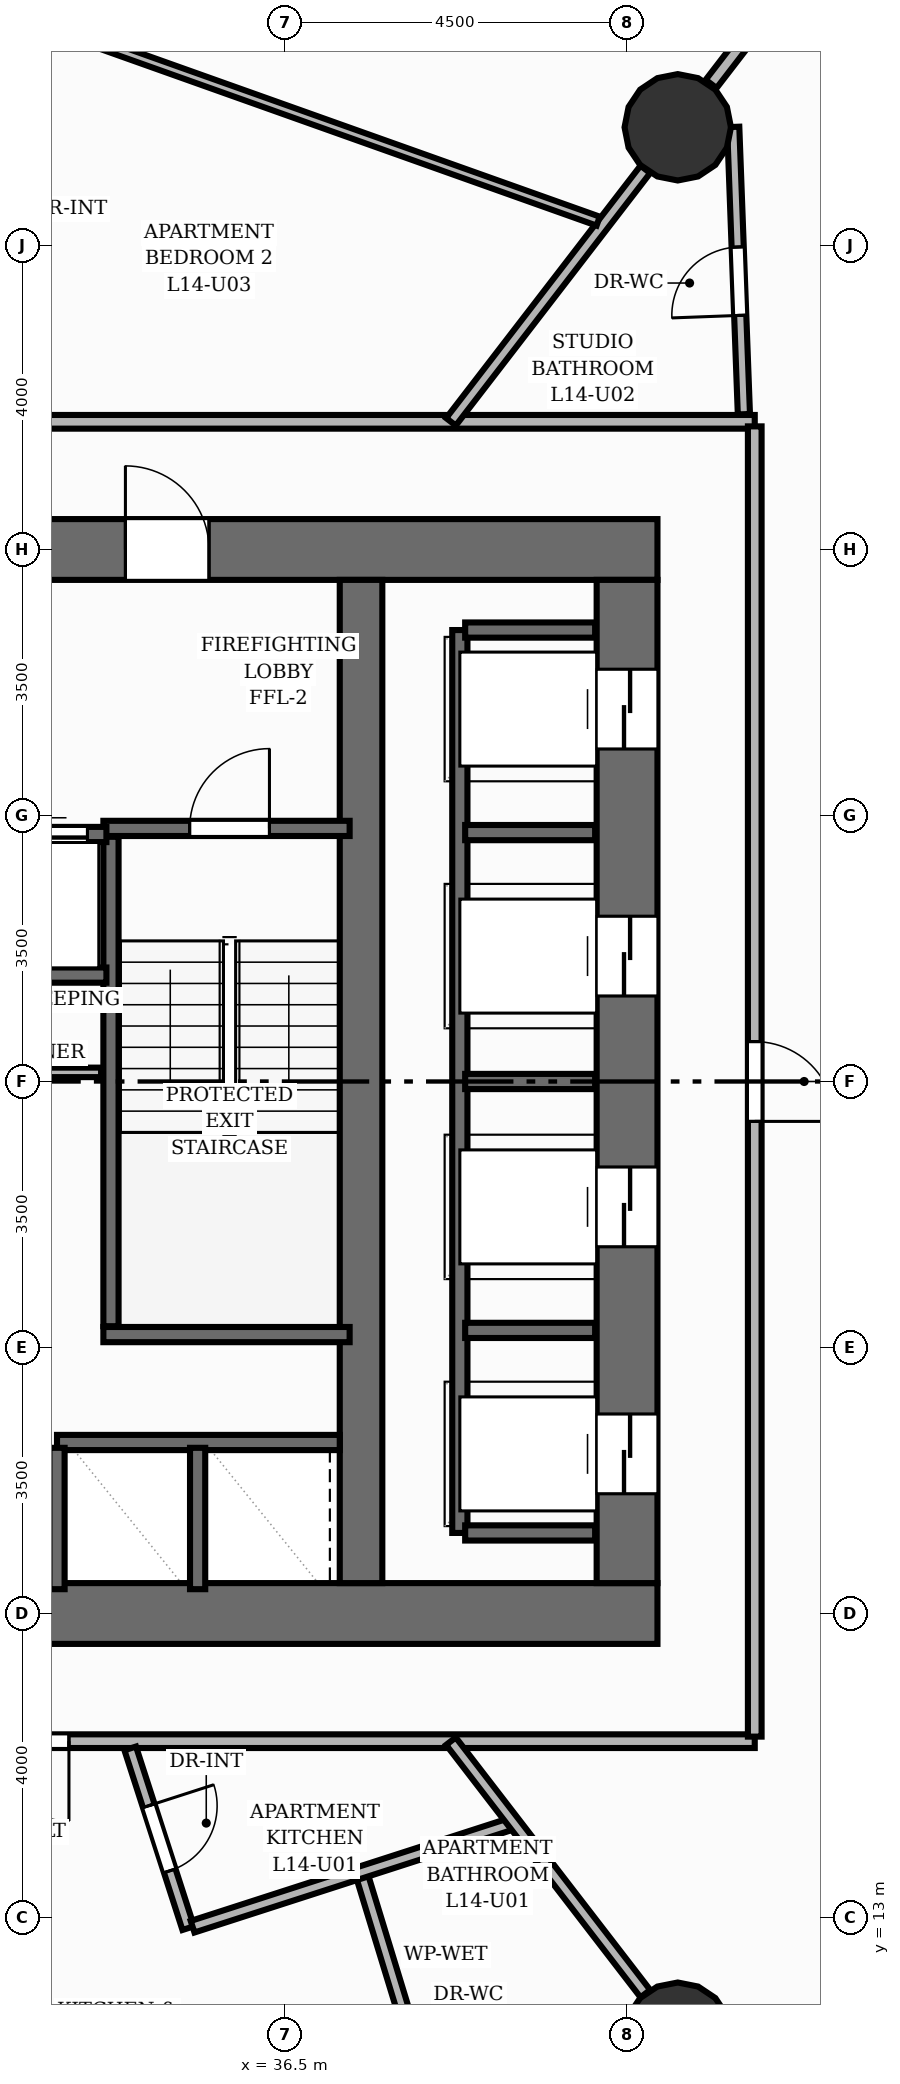
"""IFC4 building model, lengths in metres.
Left out: names, types, materials, properties, quantities, classifications, styles, units other than length and angle.
Written with IfcOpenShell. Run it as: python <this file> out.ifc"""

import sys

from ifc_helpers import new_model, si_unit, direction, frame, frame_2d, origin, origin_2d, place, context, subcontext, project, spatial, rectangle, circle, extrude, element, fill, save


model = new_model("IFC4")
c1 = context("Model", 3, precision=1e-05, world=origin(), true_north=direction((0.0, 1.0)))
c2 = subcontext(c1, "Body", "Model", "MODEL_VIEW")
j1 = project(units=[si_unit("LENGTHUNIT", "METRE"), si_unit("PLANEANGLEUNIT", "RADIAN")], contexts=[c1])
p1 = place(None, origin())
s1 = spatial("IfcSite", under=j1, at=p1, CompositionType="ELEMENT")
p2 = place(p1, origin())
s2 = spatial("IfcBuilding", under=s1, at=p2, CompositionType="ELEMENT")
p3 = place(p2, frame((0.0, 0.0, 50.4)))
s3 = spatial("IfcBuildingStorey", under=s2, at=p3, CompositionType="ELEMENT", Elevation=50.4)
p4 = place(p3, frame((22.6, 17.0, 0.0), z_axis=(0.0, 0.0, 1.0), x_axis=(1.0, 0.0, 0.0)))
e1 = element("IfcWall", 1, at=p4, inside=s3, PredefinedType="SHEAR", context=c2, shape_type="SweptSolid", body=[
    extrude(rectangle(XDim=18.8, YDim=0.8, at=frame_2d((9.4, 0.0))), origin(), (0.0, 0.0, 1.0), 3.2),
])
p5 = place(p4, frame((5.9, 0.0, 0.0)))
e2 = element("IfcOpeningElement", 2, at=p5, cuts=e1, PredefinedType="OPENING", context=c2, shape_type="SweptSolid", body=[
    extrude(rectangle(XDim=1.1, YDim=2.15, at=frame_2d((0.55, 1.075))), frame((0.0, 0.41, 0.0), z_axis=(0.0, -1.0, 0.0), x_axis=(1.0, 0.0, 0.0)), (0.0, 0.0, 1.0), 0.82),
])
p6 = place(p4, frame((9.45, 0.0, 0.0)))
e3 = element("IfcOpeningElement", 3, at=p6, cuts=e1, PredefinedType="OPENING", context=c2, shape_type="SweptSolid", body=[
    extrude(rectangle(XDim=0.9, YDim=2.1, at=frame_2d((0.45, 1.05))), frame((0.0, 0.41, 0.0), z_axis=(0.0, -1.0, 0.0), x_axis=(1.0, 0.0, 0.0)), (0.0, 0.0, 1.0), 0.82),
])
p7 = place(p3, frame((22.6, 31.0, 0.0), z_axis=(0.0, 0.0, 1.0), x_axis=(1.0, 0.0, 0.0)))
e4 = element("IfcWall", 4, at=p7, inside=s3, PredefinedType="SHEAR", context=c2, shape_type="SweptSolid", body=[
    extrude(rectangle(XDim=18.8, YDim=0.8, at=frame_2d((9.4, 0.0))), origin(), (0.0, 0.0, 1.0), 3.2),
])
p8 = place(p7, frame((11.8, 0.0, 0.0)))
e5 = element("IfcOpeningElement", 5, at=p8, cuts=e4, PredefinedType="OPENING", context=c2, shape_type="SweptSolid", body=[
    extrude(rectangle(XDim=1.1, YDim=2.15, at=frame_2d((0.55, 1.075))), frame((0.0, 0.41, 0.0), z_axis=(0.0, -1.0, 0.0), x_axis=(1.0, 0.0, 0.0)), (0.0, 0.0, 1.0), 0.82),
])
p9 = place(p3, frame((41.0, 17.4, 0.0), z_axis=(0.0, 0.0, 1.0), x_axis=(0.0, 1.0, 0.0)))
e6 = element("IfcWall", 6, at=p9, inside=s3, PredefinedType="SHEAR", context=c2, shape_type="SweptSolid", body=[
    extrude(rectangle(XDim=13.2, YDim=0.8, at=frame_2d((6.6, 0.0))), origin(), (0.0, 0.0, 1.0), 3.2),
])
p10 = place(p9, frame((1.175, 0.0, 0.0)))
e7 = element("IfcOpeningElement", 7, at=p10, cuts=e6, PredefinedType="OPENING", context=c2, shape_type="SweptSolid", body=[
    extrude(rectangle(XDim=1.05, YDim=2.15, at=frame_2d((0.525, 1.075))), frame((0.0, 0.41, 0.0), z_axis=(0.0, -1.0, 0.0), x_axis=(1.0, 0.0, 0.0)), (0.0, 0.0, 1.0), 0.82),
])
p11 = place(p9, frame((4.425, 0.0, 0.0)))
e8 = element("IfcOpeningElement", 8, at=p11, cuts=e6, PredefinedType="OPENING", context=c2, shape_type="SweptSolid", body=[
    extrude(rectangle(XDim=1.05, YDim=2.15, at=frame_2d((0.525, 1.075))), frame((0.0, 0.41, 0.0), z_axis=(0.0, -1.0, 0.0), x_axis=(1.0, 0.0, 0.0)), (0.0, 0.0, 1.0), 0.82),
])
p12 = place(p9, frame((7.725, 0.0, 0.0)))
e9 = element("IfcOpeningElement", 9, at=p12, cuts=e6, PredefinedType="OPENING", context=c2, shape_type="SweptSolid", body=[
    extrude(rectangle(XDim=1.05, YDim=2.15, at=frame_2d((0.525, 1.075))), frame((0.0, 0.41, 0.0), z_axis=(0.0, -1.0, 0.0), x_axis=(1.0, 0.0, 0.0)), (0.0, 0.0, 1.0), 0.82),
])
p13 = place(p9, frame((10.975, 0.0, 0.0)))
e10 = element("IfcOpeningElement", 10, at=p13, cuts=e6, PredefinedType="OPENING", context=c2, shape_type="SweptSolid", body=[
    extrude(rectangle(XDim=1.05, YDim=2.15, at=frame_2d((0.525, 1.075))), frame((0.0, 0.41, 0.0), z_axis=(0.0, -1.0, 0.0), x_axis=(1.0, 0.0, 0.0)), (0.0, 0.0, 1.0), 0.82),
])
p14 = place(p3, frame((37.5, 17.4, 0.0), z_axis=(0.0, 0.0, 1.0), x_axis=(0.0, 1.0, 0.0)))
e11 = element("IfcWall", 11, at=p14, inside=s3, PredefinedType="SHEAR", context=c2, shape_type="SweptSolid", body=[
    extrude(rectangle(XDim=13.2, YDim=0.56, at=frame_2d((6.6, 0.0))), origin(), (0.0, 0.0, 1.0), 3.2),
])
for number, where, z_axis, x_axis in (
    (12, (41.667, 36.555, 0.0), (0.0, 0.0, 1.0), (1.0, 0.0, 0.0)),
    (13, (41.667, 11.445, 0.0), (0.0, 0.0, 1.0), (1.0, 0.0, 0.0)),
):
    element("IfcColumn", number, at=place(p3, frame(where, z_axis=z_axis, x_axis=x_axis)), inside=s3, PredefinedType="COLUMN", context=c2, shape_type="SweptSolid", body=[
        extrude(circle(Radius=0.7, at=origin_2d()), origin(), (0.0, 0.0, 1.0), 3.2),
    ])
p15 = place(p3, frame((42.122, 39.116, 0.0), z_axis=(0.0, 0.0, 1.0), x_axis=(0.858069400356, -0.513533742001, 0.0)))
e14 = element("IfcWall", 14, at=p15, inside=s3, PredefinedType="SOLIDWALL", context=c2, shape_type="SweptSolid", body=[
    extrude(rectangle(XDim=3.323, YDim=0.25, at=frame_2d((1.661, 0.0))), origin(), (0.0, 0.0, 1.0), 2.96),
])
p16 = place(p3, frame((34.21, 20.78, 0.0), z_axis=(0.0, 0.0, 1.0), x_axis=(0.0, 1.0, 0.0)))
e15 = element("IfcWall", 15, at=p16, inside=s3, PredefinedType="SHEAR", context=c2, shape_type="SweptSolid", body=[
    extrude(rectangle(XDim=6.44, YDim=0.2, at=frame_2d((3.22, 0.0))), origin(), (0.0, 0.0, 1.0), 3.2),
])
p17 = place(p3, frame((34.11, 20.67, 0.0), z_axis=(0.0, 0.0, 1.0), x_axis=(1.0, 0.0, 0.0)))
e16 = element("IfcWall", 16, at=p17, inside=s3, PredefinedType="SHEAR", context=c2, shape_type="SweptSolid", body=[
    extrude(rectangle(XDim=3.24, YDim=0.2, at=frame_2d((1.62, 0.0))), origin(), (0.0, 0.0, 1.0), 3.2),
])
p18 = place(p3, frame((34.11, 27.33, 0.0), z_axis=(0.0, 0.0, 1.0), x_axis=(1.0, 0.0, 0.0)))
e17 = element("IfcWall", 17, at=p18, inside=s3, PredefinedType="SHEAR", context=c2, shape_type="SweptSolid", body=[
    extrude(rectangle(XDim=3.24, YDim=0.2, at=frame_2d((1.62, 0.0))), origin(), (0.0, 0.0, 1.0), 3.2),
])
p19 = place(p18, frame((1.135, 0.0, 0.0)))
e18 = element("IfcOpeningElement", 18, at=p19, cuts=e17, PredefinedType="OPENING", context=c2, shape_type="SweptSolid", body=[
    extrude(rectangle(XDim=1.05, YDim=2.15, at=frame_2d((0.525, 1.075))), frame((0.0, 0.11, 0.0), z_axis=(0.0, -1.0, 0.0), x_axis=(1.0, 0.0, 0.0)), (0.0, 0.0, 1.0), 0.22),
])
p20 = place(p3, frame((31.85, 27.25, 0.0), z_axis=(0.0, 0.0, 1.0), x_axis=(1.0, 0.0, 0.0)))
e19 = element("IfcWall", 19, at=p20, inside=s3, PredefinedType="SHEAR", context=c2, shape_type="SweptSolid", body=[
    extrude(rectangle(XDim=2.3, YDim=0.2, at=frame_2d((1.15, 0.0))), origin(), (0.0, 0.0, 1.0), 3.2),
])
p21 = place(p20, frame((0.95, 0.0, 0.0)))
e20 = element("IfcOpeningElement", 20, at=p21, cuts=e19, PredefinedType="OPENING", context=c2, shape_type="SweptSolid", body=[
    extrude(rectangle(XDim=1.1, YDim=2.15, at=frame_2d((0.55, 1.075))), frame((0.0, 0.11, 0.0), z_axis=(0.0, -1.0, 0.0), x_axis=(1.0, 0.0, 0.0)), (0.0, 0.0, 1.0), 0.22),
])
p22 = place(p3, frame((31.85, 25.4, 0.0), z_axis=(0.0, 0.0, 1.0), x_axis=(1.0, 0.0, 0.0)))
e21 = element("IfcWall", 21, at=p22, inside=s3, PredefinedType="SHEAR", context=c2, shape_type="SweptSolid", body=[
    extrude(rectangle(XDim=2.3, YDim=0.2, at=frame_2d((1.15, 0.0))), origin(), (0.0, 0.0, 1.0), 3.2),
])
p23 = place(p3, frame((38.8, 18.06, 0.0), z_axis=(0.0, 0.0, 1.0), x_axis=(0.0, 1.0, 0.0)))
e22 = element("IfcWall", 22, at=p23, inside=s3, PredefinedType="SHEAR", context=c2, shape_type="SweptSolid", body=[
    extrude(rectangle(XDim=11.88, YDim=0.2, at=frame_2d((5.94, 0.0))), origin(), (0.0, 0.0, 1.0), 3.2),
])
for number, where, z_axis, x_axis in (
    (23, (38.87, 18.06, 0.0), (0.0, 0.0, 1.0), (1.0, 0.0, 0.0)),
    (24, (38.87, 29.94, 0.0), (0.0, 0.0, 1.0), (1.0, 0.0, 0.0)),
    (25, (38.87, 20.725, 0.0), (0.0, 0.0, 1.0), (1.0, 0.0, 0.0)),
    (26, (38.87, 24.0, 0.0), (0.0, 0.0, 1.0), (1.0, 0.0, 0.0)),
    (27, (38.87, 27.275, 0.0), (0.0, 0.0, 1.0), (1.0, 0.0, 0.0)),
):
    element("IfcWall", number, at=place(p3, frame(where, z_axis=z_axis, x_axis=x_axis)), inside=s3, PredefinedType="SHEAR", context=c2, shape_type="SweptSolid", body=[
        extrude(rectangle(XDim=1.71, YDim=0.2, at=frame_2d((0.855, 0.0))), origin(), (0.0, 0.0, 1.0), 3.2),
    ])
p24 = place(p3, frame((33.5, 19.25, 0.0), z_axis=(0.0, 0.0, 1.0), x_axis=(1.0, 0.0, 0.0)))
e28 = element("IfcWall", 28, at=p24, inside=s3, PredefinedType="SHEAR", context=c2, shape_type="SweptSolid", body=[
    extrude(rectangle(XDim=3.72, YDim=0.2, at=frame_2d((1.86, 0.0))), origin(), (0.0, 0.0, 1.0), 3.2),
])
for number, where, z_axis, x_axis in (
    (29, (33.5, 17.32, 0.0), (0.0, 0.0, 1.0), (0.0, 1.0, 0.0)),
    (30, (35.35, 17.32, 0.0), (0.0, 0.0, 1.0), (0.0, 1.0, 0.0)),
):
    element("IfcWall", number, at=place(p3, frame(where, z_axis=z_axis, x_axis=x_axis)), inside=s3, PredefinedType="SHEAR", context=c2, shape_type="SweptSolid", body=[
        extrude(rectangle(XDim=1.86, YDim=0.2, at=frame_2d((0.93, 0.0))), origin(), (0.0, 0.0, 1.0), 3.2),
    ])
p25 = place(p3, frame((31.76, 24.12, 0.0), z_axis=(0.0, 0.0, 1.0), x_axis=(1.0, 0.0, 0.0)))
e31 = element("IfcWall", 31, at=p25, inside=s3, PredefinedType="PARTITIONING", context=c2, shape_type="SweptSolid", body=[
    extrude(rectangle(XDim=2.32, YDim=0.125, at=frame_2d((1.16, 0.0))), origin(), (0.0, 0.0, 1.0), 2.955),
])
p26 = place(p25, frame((0.64, 0.0, 0.0)))
e32 = element("IfcOpeningElement", 32, at=p26, cuts=e31, PredefinedType="OPENING", context=c2, shape_type="SweptSolid", body=[
    extrude(rectangle(XDim=0.9, YDim=2.1, at=frame_2d((0.45, 1.05))), frame((0.0, 0.073, 0.0), z_axis=(0.0, -1.0, 0.0), x_axis=(1.0, 0.0, 0.0)), (0.0, 0.0, 1.0), 0.145),
])
p27 = place(p3, frame((42.106, 37.126, 0.0), z_axis=(0.0, 0.0, 1.0), x_axis=(0.610021184497, 0.792385104898, 0.0)))
e33 = element("IfcWall", 33, at=p27, inside=s3, PredefinedType="PARTITIONING", context=c2, shape_type="SweptSolid", body=[
    extrude(rectangle(XDim=1.672, YDim=0.18, at=frame_2d((0.836, 0.0))), origin(), (0.0, 0.0, 1.0), 2.178),
])
p28 = place(p3, frame((42.68, 15.32, 0.0), z_axis=(0.0, 0.0, 1.0), x_axis=(-1.0, 0.0, 0.0)))
e34 = element("IfcWall", 34, at=p28, inside=s3, PredefinedType="PARTITIONING", context=c2, shape_type="SweptSolid", body=[
    extrude(rectangle(XDim=21.239, YDim=0.18, at=frame_2d((10.619, 0.0))), origin(), (0.0, 0.0, 1.0), 2.955),
])
p29 = place(p28, frame((9.023, 0.0, 0.0)))
e35 = element("IfcOpeningElement", 35, at=p29, cuts=e34, PredefinedType="OPENING", context=c2, shape_type="SweptSolid", body=[
    extrude(rectangle(XDim=1.05, YDim=2.15, at=frame_2d((0.525, 1.075))), frame((0.0, 0.1, 0.0), z_axis=(0.0, -1.0, 0.0), x_axis=(1.0, 0.0, 0.0)), (0.0, 0.0, 1.0), 0.2),
])
p30 = place(p3, frame((32.15, 32.68, 0.0), z_axis=(0.0, 0.0, 1.0), x_axis=(1.0, 0.0, 0.0)))
e36 = element("IfcWall", 36, at=p30, inside=s3, PredefinedType="PARTITIONING", context=c2, shape_type="SweptSolid", body=[
    extrude(rectangle(XDim=10.53, YDim=0.18, at=frame_2d((5.265, 0.0))), origin(), (0.0, 0.0, 1.0), 2.955),
])
p31 = place(p3, frame((42.68, 32.62, 0.0), z_axis=(0.0, 0.0, 1.0), x_axis=(0.0, -1.0, 0.0)))
e37 = element("IfcWall", 37, at=p31, inside=s3, PredefinedType="PARTITIONING", context=c2, shape_type="SweptSolid", body=[
    extrude(rectangle(XDim=17.24, YDim=0.18, at=frame_2d((8.62, 0.0))), origin(), (0.0, 0.0, 1.0), 2.955),
])
p32 = place(p31, frame((8.095, 0.0, 0.0)))
e38 = element("IfcOpeningElement", 38, at=p32, cuts=e37, PredefinedType="OPENING", context=c2, shape_type="SweptSolid", body=[
    extrude(rectangle(XDim=1.05, YDim=2.15, at=frame_2d((0.525, 1.075))), frame((0.0, 0.1, 0.0), z_axis=(0.0, -1.0, 0.0), x_axis=(1.0, 0.0, 0.0)), (0.0, 0.0, 1.0), 0.2),
])
p33 = place(p3, frame((37.5, 13.594, 0.0), z_axis=(0.0, 0.0, 1.0), x_axis=(0.292167210162, -0.956367252318, 0.0)))
e39 = element("IfcWall", 39, at=p33, inside=s3, PredefinedType="PLUMBINGWALL", context=c2, shape_type="SweptSolid", body=[
    extrude(rectangle(XDim=5.438, YDim=0.16, at=frame_2d((2.719, 0.0))), origin(), (0.0, 0.0, 1.0), 2.955),
])
p34 = place(p33, frame((2.269, 0.0, 0.0)))
e40 = element("IfcOpeningElement", 40, at=p34, cuts=e39, PredefinedType="OPENING", context=c2, shape_type="SweptSolid", body=[
    extrude(rectangle(XDim=0.9, YDim=2.1, at=frame_2d((0.45, 1.05))), frame((0.0, 0.09, 0.0), z_axis=(0.0, -1.0, 0.0), x_axis=(1.0, 0.0, 0.0)), (0.0, 0.0, 1.0), 0.18),
])
p35 = place(p3, frame((34.463, 15.225, 0.0), z_axis=(0.0, 0.0, 1.0), x_axis=(0.307163549255, -0.951656741693, 0.0)))
e41 = element("IfcWall", 41, at=p35, inside=s3, PredefinedType="PLUMBINGWALL", context=c2, shape_type="SweptSolid", body=[
    extrude(rectangle(XDim=2.485, YDim=0.16, at=frame_2d((1.242, 0.0))), origin(), (0.0, 0.0, 1.0), 2.955),
])
p36 = place(p35, frame((0.792, 0.0, 0.0)))
e42 = element("IfcOpeningElement", 42, at=p36, cuts=e41, PredefinedType="OPENING", context=c2, shape_type="SweptSolid", body=[
    extrude(rectangle(XDim=0.9, YDim=2.1, at=frame_2d((0.45, 1.05))), frame((0.0, 0.09, 0.0), z_axis=(0.0, -1.0, 0.0), x_axis=(1.0, 0.0, 0.0)), (0.0, 0.0, 1.0), 0.18),
])
p37 = place(p3, frame((35.284, 12.879, 0.0), z_axis=(0.0, 0.0, 1.0), x_axis=(0.951640751353, 0.307213086253, 0.0)))
e43 = element("IfcWall", 43, at=p37, inside=s3, PredefinedType="PLUMBINGWALL", context=c2, shape_type="SweptSolid", body=[
    extrude(rectangle(XDim=4.443, YDim=0.16, at=frame_2d((2.222, 0.0))), origin(), (0.0, 0.0, 1.0), 2.955),
])
p38 = place(p3, frame((38.683, 15.32, 0.0), z_axis=(0.0, 0.0, 1.0), x_axis=(0.610070932863, -0.792346803411, 0.0)))
e44 = element("IfcWall", 44, at=p38, inside=s3, PredefinedType="PLUMBINGWALL", context=c2, shape_type="SweptSolid", body=[
    extrude(rectangle(XDim=4.192, YDim=0.16, at=frame_2d((2.096, 0.0))), origin(), (0.0, 0.0, 1.0), 2.178),
])
p39 = place(p3, frame((42.537, 32.78, 0.0), z_axis=(0.0, 0.0, 1.0), x_axis=(-0.037109528702, 0.99931120422, 0.0)))
e45 = element("IfcWall", 45, at=p39, inside=s3, PredefinedType="PLUMBINGWALL", context=c2, shape_type="SweptSolid", body=[
    extrude(rectangle(XDim=3.783, YDim=0.16, at=frame_2d((1.892, 0.0))), origin(), (0.0, 0.0, 1.0), 2.955),
])
p40 = place(p39, frame((1.302, 0.0, 0.0)))
e46 = element("IfcOpeningElement", 46, at=p40, cuts=e45, PredefinedType="OPENING", context=c2, shape_type="SweptSolid", body=[
    extrude(rectangle(XDim=0.9, YDim=2.1, at=frame_2d((0.45, 1.05))), frame((0.0, 0.09, 0.0), z_axis=(0.0, -1.0, 0.0), x_axis=(1.0, 0.0, 0.0)), (0.0, 0.0, 1.0), 0.18),
])
p41 = place(p3, frame((38.683, 32.68, 0.0), z_axis=(0.0, 0.0, 1.0), x_axis=(0.610034370134, 0.792374953703, 0.0)))
e47 = element("IfcWall", 47, at=p41, inside=s3, PredefinedType="PLUMBINGWALL", context=c2, shape_type="SweptSolid", body=[
    extrude(rectangle(XDim=4.192, YDim=0.16, at=frame_2d((2.096, 0.0))), origin(), (0.0, 0.0, 1.0), 2.178),
])
p42 = place(p3, frame((40.62, 35.32, 0.0), z_axis=(0.0, 0.0, 1.0), x_axis=(-0.9420945855, 0.335347270709, 0.0)))
e48 = element("IfcWall", 48, at=p42, inside=s3, PredefinedType="PARTITIONING", context=c2, shape_type="SweptSolid", body=[
    extrude(rectangle(XDim=8.773, YDim=0.125, at=frame_2d((4.387, 0.0))), origin(), (0.0, 0.0, 1.0), 2.955),
])
p43 = place(p19, origin())
e49 = element("IfcDoor", 49, at=p43, inside=s3, OperationType="SINGLE_SWING_RIGHT", PredefinedType="DOOR", context=c2, shape_type="SweptSolid", body=[
    extrude(rectangle(XDim=1.05, YDim=2.15, at=frame_2d((0.525, 1.075))), frame((0.0, 0.025, 0.0), z_axis=(0.0, -1.0, 0.0), x_axis=(1.0, 0.0, 0.0)), (0.0, 0.0, 1.0), 0.05),
])
fill(e18, e49)
p44 = place(p8, origin())
e50 = element("IfcDoor", 50, at=p44, inside=s3, OperationType="SINGLE_SWING_LEFT", PredefinedType="DOOR", context=c2, shape_type="SweptSolid", body=[
    extrude(rectangle(XDim=1.1, YDim=2.15, at=frame_2d((0.55, 1.075))), frame((0.0, 0.025, 0.0), z_axis=(0.0, -1.0, 0.0), x_axis=(1.0, 0.0, 0.0)), (0.0, 0.0, 1.0), 0.05),
])
fill(e5, e50)
p45 = place(p21, origin())
e51 = element("IfcDoor", 51, at=p45, inside=s3, OperationType="DOUBLE_DOOR_SLIDING", PredefinedType="DOOR", context=c2, shape_type="SweptSolid", body=[
    extrude(rectangle(XDim=1.1, YDim=2.15, at=frame_2d((0.55, 1.075))), frame((0.0, 0.025, 0.0), z_axis=(0.0, -1.0, 0.0), x_axis=(1.0, 0.0, 0.0)), (0.0, 0.0, 1.0), 0.05),
])
fill(e20, e51)
p46 = place(p10, origin())
e52 = element("IfcDoor", 52, at=p46, inside=s3, OperationType="DOUBLE_DOOR_SLIDING", PredefinedType="DOOR", context=c2, shape_type="SweptSolid", body=[
    extrude(rectangle(XDim=1.05, YDim=2.15, at=frame_2d((0.525, 1.075))), frame((0.0, 0.025, 0.0), z_axis=(0.0, -1.0, 0.0), x_axis=(1.0, 0.0, 0.0)), (0.0, 0.0, 1.0), 0.05),
])
fill(e7, e52)
p47 = place(p11, origin())
e53 = element("IfcDoor", 53, at=p47, inside=s3, OperationType="DOUBLE_DOOR_SLIDING", PredefinedType="DOOR", context=c2, shape_type="SweptSolid", body=[
    extrude(rectangle(XDim=1.05, YDim=2.15, at=frame_2d((0.525, 1.075))), frame((0.0, 0.025, 0.0), z_axis=(0.0, -1.0, 0.0), x_axis=(1.0, 0.0, 0.0)), (0.0, 0.0, 1.0), 0.05),
])
fill(e8, e53)
p48 = place(p12, origin())
e54 = element("IfcDoor", 54, at=p48, inside=s3, OperationType="DOUBLE_DOOR_SLIDING", PredefinedType="DOOR", context=c2, shape_type="SweptSolid", body=[
    extrude(rectangle(XDim=1.05, YDim=2.15, at=frame_2d((0.525, 1.075))), frame((0.0, 0.025, 0.0), z_axis=(0.0, -1.0, 0.0), x_axis=(1.0, 0.0, 0.0)), (0.0, 0.0, 1.0), 0.05),
])
fill(e9, e54)
p49 = place(p13, origin())
e55 = element("IfcDoor", 55, at=p49, inside=s3, OperationType="DOUBLE_DOOR_SLIDING", PredefinedType="DOOR", context=c2, shape_type="SweptSolid", body=[
    extrude(rectangle(XDim=1.05, YDim=2.15, at=frame_2d((0.525, 1.075))), frame((0.0, 0.025, 0.0), z_axis=(0.0, -1.0, 0.0), x_axis=(1.0, 0.0, 0.0)), (0.0, 0.0, 1.0), 0.05),
])
fill(e10, e55)
p50 = place(p29, origin())
e56 = element("IfcDoor", 56, at=p50, inside=s3, OperationType="SINGLE_SWING_LEFT", PredefinedType="DOOR", context=c2, shape_type="SweptSolid", body=[
    extrude(rectangle(XDim=1.05, YDim=2.15, at=frame_2d((0.525, 1.075))), frame((0.0, 0.025, 0.0), z_axis=(0.0, -1.0, 0.0), x_axis=(1.0, 0.0, 0.0)), (0.0, 0.0, 1.0), 0.05),
])
fill(e35, e56)
p51 = place(p36, origin())
e57 = element("IfcDoor", 57, at=p51, inside=s3, OperationType="SINGLE_SWING_LEFT", PredefinedType="DOOR", context=c2, shape_type="SweptSolid", body=[
    extrude(rectangle(XDim=0.9, YDim=2.1, at=frame_2d((0.45, 1.05))), frame((0.0, 0.025, 0.0), z_axis=(0.0, -1.0, 0.0), x_axis=(1.0, 0.0, 0.0)), (0.0, 0.0, 1.0), 0.05),
])
fill(e42, e57)
p52 = place(p32, origin())
e58 = element("IfcDoor", 58, at=p52, inside=s3, OperationType="SINGLE_SWING_RIGHT", PredefinedType="DOOR", context=c2, shape_type="SweptSolid", body=[
    extrude(rectangle(XDim=1.05, YDim=2.15, at=frame_2d((0.525, 1.075))), frame((0.0, 0.025, 0.0), z_axis=(0.0, -1.0, 0.0), x_axis=(1.0, 0.0, 0.0)), (0.0, 0.0, 1.0), 0.05),
])
fill(e38, e58)
p53 = place(p40, origin())
e59 = element("IfcDoor", 59, at=p53, inside=s3, OperationType="SINGLE_SWING_LEFT", PredefinedType="DOOR", context=c2, shape_type="SweptSolid", body=[
    extrude(rectangle(XDim=0.9, YDim=2.1, at=frame_2d((0.45, 1.05))), frame((0.0, 0.025, 0.0), z_axis=(0.0, -1.0, 0.0), x_axis=(1.0, 0.0, 0.0)), (0.0, 0.0, 1.0), 0.05),
])
fill(e46, e59)
save(model, sys.argv[1])
